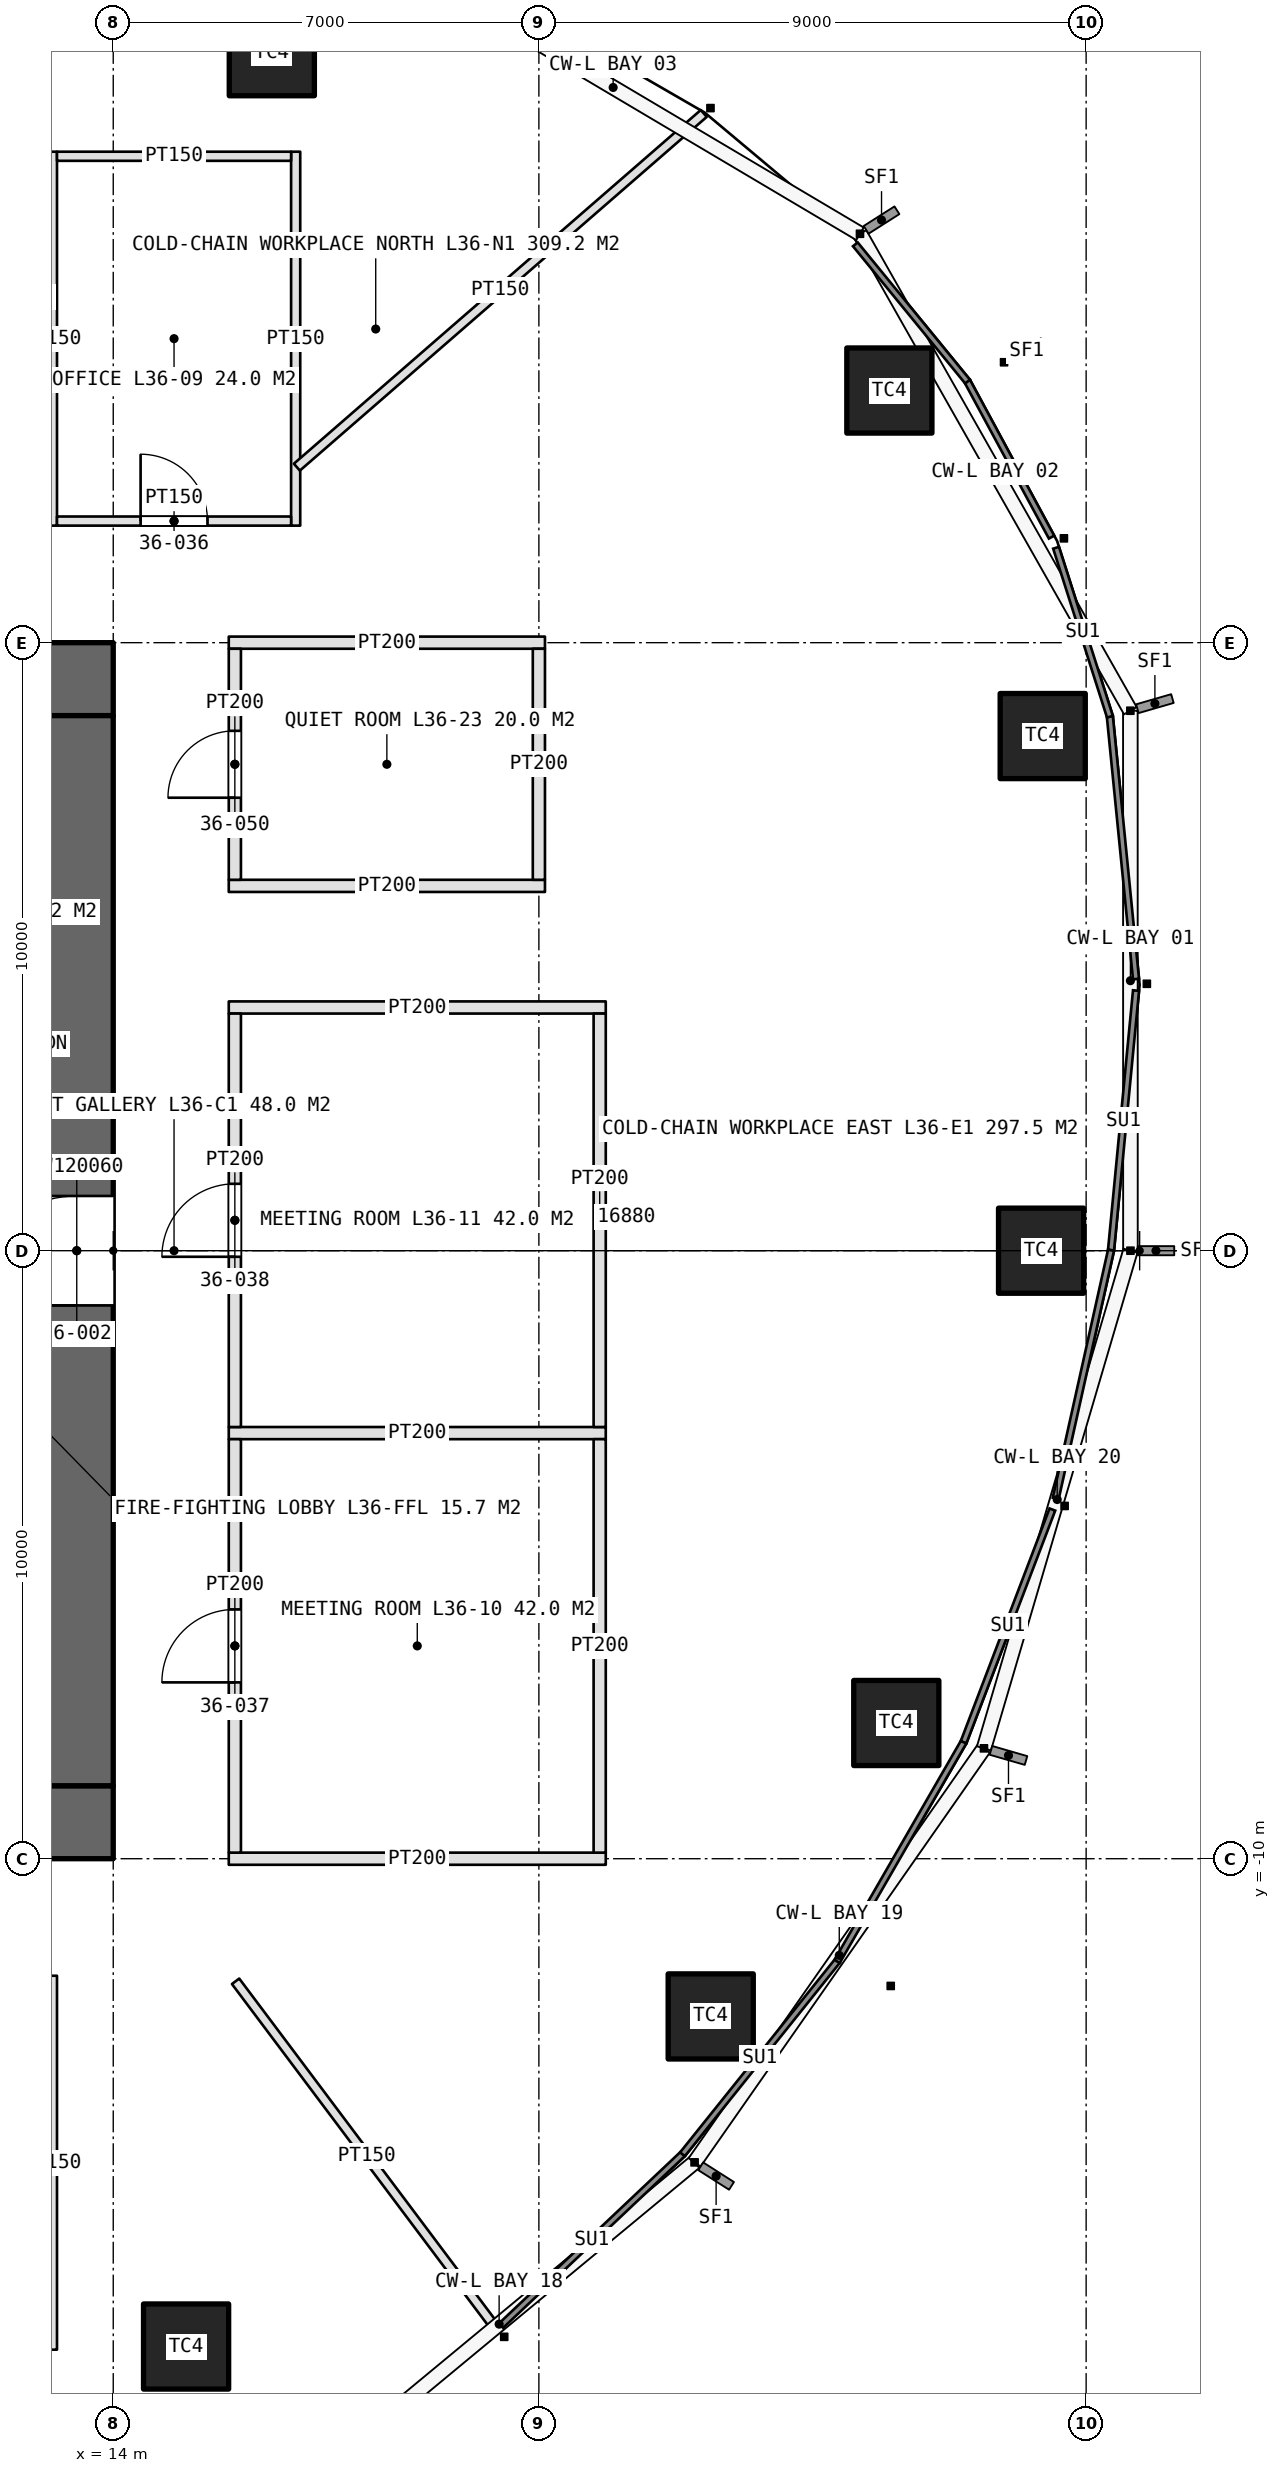
"""IFC4 building model, lengths in metres.
Left out: names, types, materials, properties, quantities, classifications, styles, units other than length and angle.
Written with IfcOpenShell. Run it as: python <this file> out.ifc"""

import sys

from ifc_helpers import new_model, si_unit, direction, frame, frame_2d, origin, origin_2d, place, context, subcontext, project, spatial, rectangle, extrude, element, fill, save


model = new_model("IFC4")
c1 = context("Model", 3, precision=1e-05, world=origin(), true_north=direction((0.0, 1.0)))
c2 = subcontext(c1, "Body", "Model", "MODEL_VIEW")
j1 = project(units=[si_unit("LENGTHUNIT", "METRE"), si_unit("PLANEANGLEUNIT", "RADIAN")], contexts=[c1])
p1 = place(None, origin())
s1 = spatial("IfcSite", under=j1, at=p1, CompositionType="ELEMENT")
p2 = place(p1, origin())
s2 = spatial("IfcBuilding", under=s1, at=p2, CompositionType="ELEMENT")
p3 = place(p2, frame((0.0, 0.0, 168.0)))
s3 = spatial("IfcBuildingStorey", under=s2, at=p3, CompositionType="ELEMENT", Elevation=168.0)
p4 = place(p3, frame((-14.0, -9.4, 0.0), z_axis=(0.0, 0.0, 1.0), x_axis=(1.0, 0.0, 0.0)))
e1 = element("IfcWall", 1, at=p4, inside=s3, PredefinedType="SHEAR", context=c2, shape_type="SweptSolid", body=[
    extrude(rectangle(XDim=28.0, YDim=1.2, at=frame_2d((14.0, 0.0))), origin(), (0.0, 0.0, 1.0), 4.2),
])
p5 = place(p4, frame((13.1, 0.0, 0.0)))
e2 = element("IfcOpeningElement", 2, at=p5, cuts=e1, PredefinedType="OPENING", context=c2, shape_type="SweptSolid", body=[
    extrude(rectangle(XDim=1.8, YDim=2.4, at=frame_2d((0.9, 1.2))), frame((0.0, 0.61, 0.0), z_axis=(0.0, -1.0, 0.0), x_axis=(1.0, 0.0, 0.0)), (0.0, 0.0, 1.0), 1.22),
])
p6 = place(p4, frame((22.9, 0.0, 0.0)))
e3 = element("IfcOpeningElement", 3, at=p6, cuts=e1, PredefinedType="OPENING", context=c2, shape_type="SweptSolid", body=[
    extrude(rectangle(XDim=2.2, YDim=2.7, at=frame_2d((1.1, 1.35))), frame((0.0, 0.61, 0.0), z_axis=(0.0, -1.0, 0.0), x_axis=(1.0, 0.0, 0.0)), (0.0, 0.0, 1.0), 1.22),
])
p7 = place(p3, frame((14.0, 9.4, 0.0), z_axis=(0.0, 0.0, 1.0), x_axis=(-1.0, 0.0, 0.0)))
e4 = element("IfcWall", 4, at=p7, inside=s3, PredefinedType="SHEAR", context=c2, shape_type="SweptSolid", body=[
    extrude(rectangle(XDim=28.0, YDim=1.2, at=frame_2d((14.0, 0.0))), origin(), (0.0, 0.0, 1.0), 4.2),
])
p8 = place(p7, frame((24.0, 0.0, 0.0)))
e5 = element("IfcOpeningElement", 5, at=p8, cuts=e4, PredefinedType="OPENING", context=c2, shape_type="SweptSolid", body=[
    extrude(rectangle(XDim=1.0, YDim=2.4, at=frame_2d((0.5, 1.2))), frame((0.0, 0.61, 0.0), z_axis=(0.0, -1.0, 0.0), x_axis=(1.0, 0.0, 0.0)), (0.0, 0.0, 1.0), 1.22),
])
p9 = place(p7, frame((13.1, 0.0, 0.0)))
e6 = element("IfcOpeningElement", 6, at=p9, cuts=e4, PredefinedType="OPENING", context=c2, shape_type="SweptSolid", body=[
    extrude(rectangle(XDim=1.8, YDim=2.4, at=frame_2d((0.9, 1.2))), frame((0.0, 0.61, 0.0), z_axis=(0.0, -1.0, 0.0), x_axis=(1.0, 0.0, 0.0)), (0.0, 0.0, 1.0), 1.22),
])
p10 = place(p3, frame((13.4, -8.8, 0.0), z_axis=(0.0, 0.0, 1.0), x_axis=(0.0, 1.0, 0.0)))
e7 = element("IfcWall", 7, at=p10, inside=s3, PredefinedType="SHEAR", context=c2, shape_type="SweptSolid", body=[
    extrude(rectangle(XDim=17.6, YDim=1.2, at=frame_2d((8.8, 0.0))), origin(), (0.0, 0.0, 1.0), 4.2),
])
p11 = place(p10, frame((7.9, 0.0, 0.0)))
e8 = element("IfcOpeningElement", 8, at=p11, cuts=e7, PredefinedType="OPENING", context=c2, shape_type="SweptSolid", body=[
    extrude(rectangle(XDim=1.8, YDim=2.4, at=frame_2d((0.9, 1.2))), frame((0.0, 0.61, 0.0), z_axis=(0.0, -1.0, 0.0), x_axis=(1.0, 0.0, 0.0)), (0.0, 0.0, 1.0), 1.22),
])
for number, where, z_axis, x_axis in (
    (9, (29.259, 0.0, 0.0), (0.0, 0.0, 1.0), (1.0, 0.0, 0.0)),
    (10, (29.286, 8.464, 0.0), (0.0, 0.0, 1.0), (1.0, 0.0, 0.0)),
    (11, (26.764, 14.147, 0.0), (0.0, 0.0, 1.0), (1.0, 0.0, 0.0)),
    (12, (16.608, 19.695, 0.0), (0.0, 0.0, 1.0), (1.0, 0.0, 0.0)),
    (13, (15.198, -18.023, 0.0), (0.0, 0.0, 1.0), (1.0, 0.0, 0.0)),
    (14, (23.826, -12.594, 0.0), (0.0, 0.0, 1.0), (1.0, 0.0, 0.0)),
    (15, (26.878, -7.768, 0.0), (0.0, 0.0, 1.0), (1.0, 0.0, 0.0)),
):
    element("IfcColumn", number, at=place(p3, frame(where, z_axis=z_axis, x_axis=x_axis)), inside=s3, PredefinedType="COLUMN", context=c2, shape_type="SweptSolid", body=[
        extrude(rectangle(XDim=1.4, YDim=1.4, at=origin_2d()), origin(), (0.0, 0.0, 1.0), 4.2),
    ])
for number, where, z_axis, x_axis in (
    (16, (13.0, 11.925, 0.0), (0.0, 0.0, 1.0), (0.0, 1.0, 0.0)),
    (17, (17.0, 11.925, 0.0), (0.0, 0.0, 1.0), (0.0, 1.0, 0.0)),
):
    element("IfcWall", number, at=place(p3, frame(where, z_axis=z_axis, x_axis=x_axis)), inside=s3, PredefinedType="PARTITIONING", context=c2, shape_type="SweptSolid", body=[
        extrude(rectangle(XDim=6.15, YDim=0.15, at=frame_2d((3.075, 0.0))), origin(), (0.0, 0.0, 1.0), 3.0),
    ])
p12 = place(p3, frame((13.075, 12.0, 0.0), z_axis=(0.0, 0.0, 1.0), x_axis=(1.0, 0.0, 0.0)))
e18 = element("IfcWall", 18, at=p12, inside=s3, PredefinedType="PARTITIONING", context=c2, shape_type="SweptSolid", body=[
    extrude(rectangle(XDim=3.85, YDim=0.15, at=frame_2d((1.925, 0.0))), origin(), (0.0, 0.0, 1.0), 3.0),
])
p13 = place(p12, frame((1.375, 0.0, 0.0)))
e19 = element("IfcOpeningElement", 19, at=p13, cuts=e18, PredefinedType="OPENING", context=c2, shape_type="SweptSolid", body=[
    extrude(rectangle(XDim=1.1, YDim=2.3, at=frame_2d((0.55, 1.15))), frame((0.0, 0.085, 0.0), z_axis=(0.0, -1.0, 0.0), x_axis=(1.0, 0.0, 0.0)), (0.0, 0.0, 1.0), 0.17),
])
p14 = place(p3, frame((13.075, 18.0, 0.0), z_axis=(0.0, 0.0, 1.0), x_axis=(1.0, 0.0, 0.0)))
e20 = element("IfcWall", 20, at=p14, inside=s3, PredefinedType="PARTITIONING", context=c2, shape_type="SweptSolid", body=[
    extrude(rectangle(XDim=3.85, YDim=0.15, at=frame_2d((1.925, 0.0))), origin(), (0.0, 0.0, 1.0), 3.0),
])
for number, where, z_axis, x_axis in (
    (21, (15.9, -10.0, 0.0), (0.0, 0.0, 1.0), (1.0, 0.0, 0.0)),
    (22, (15.9, -3.0, 0.0), (0.0, 0.0, 1.0), (1.0, 0.0, 0.0)),
    (23, (15.9, 4.0, 0.0), (0.0, 0.0, 1.0), (1.0, 0.0, 0.0)),
):
    element("IfcWall", number, at=place(p3, frame(where, z_axis=z_axis, x_axis=x_axis)), inside=s3, PredefinedType="PARTITIONING", context=c2, shape_type="SweptSolid", body=[
        extrude(rectangle(XDim=6.2, YDim=0.2, at=frame_2d((3.1, 0.0))), origin(), (0.0, 0.0, 1.0), 3.0),
    ])
p15 = place(p3, frame((16.0, -9.9, 0.0), z_axis=(0.0, 0.0, 1.0), x_axis=(0.0, 1.0, 0.0)))
e24 = element("IfcWall", 24, at=p15, inside=s3, PredefinedType="PARTITIONING", context=c2, shape_type="SweptSolid", body=[
    extrude(rectangle(XDim=6.8, YDim=0.2, at=frame_2d((3.4, 0.0))), origin(), (0.0, 0.0, 1.0), 3.0),
])
p16 = place(p15, frame((2.8, 0.0, 0.0)))
e25 = element("IfcOpeningElement", 25, at=p16, cuts=e24, PredefinedType="OPENING", context=c2, shape_type="SweptSolid", body=[
    extrude(rectangle(XDim=1.2, YDim=2.4, at=frame_2d((0.6, 1.2))), frame((0.0, 0.11, 0.0), z_axis=(0.0, -1.0, 0.0), x_axis=(1.0, 0.0, 0.0)), (0.0, 0.0, 1.0), 0.22),
])
p17 = place(p3, frame((22.0, -9.9, 0.0), z_axis=(0.0, 0.0, 1.0), x_axis=(0.0, 1.0, 0.0)))
e26 = element("IfcWall", 26, at=p17, inside=s3, PredefinedType="PARTITIONING", context=c2, shape_type="SweptSolid", body=[
    extrude(rectangle(XDim=6.8, YDim=0.2, at=frame_2d((3.4, 0.0))), origin(), (0.0, 0.0, 1.0), 3.0),
])
p18 = place(p3, frame((16.0, -2.9, 0.0), z_axis=(0.0, 0.0, 1.0), x_axis=(0.0, 1.0, 0.0)))
e27 = element("IfcWall", 27, at=p18, inside=s3, PredefinedType="PARTITIONING", context=c2, shape_type="SweptSolid", body=[
    extrude(rectangle(XDim=6.8, YDim=0.2, at=frame_2d((3.4, 0.0))), origin(), (0.0, 0.0, 1.0), 3.0),
])
p19 = place(p18, frame((2.8, 0.0, 0.0)))
e28 = element("IfcOpeningElement", 28, at=p19, cuts=e27, PredefinedType="OPENING", context=c2, shape_type="SweptSolid", body=[
    extrude(rectangle(XDim=1.2, YDim=2.4, at=frame_2d((0.6, 1.2))), frame((0.0, 0.11, 0.0), z_axis=(0.0, -1.0, 0.0), x_axis=(1.0, 0.0, 0.0)), (0.0, 0.0, 1.0), 0.22),
])
p20 = place(p3, frame((22.0, -2.9, 0.0), z_axis=(0.0, 0.0, 1.0), x_axis=(0.0, 1.0, 0.0)))
e29 = element("IfcWall", 29, at=p20, inside=s3, PredefinedType="PARTITIONING", context=c2, shape_type="SweptSolid", body=[
    extrude(rectangle(XDim=6.8, YDim=0.2, at=frame_2d((3.4, 0.0))), origin(), (0.0, 0.0, 1.0), 3.0),
])
p21 = place(p3, frame((13.0, -11.925, 0.0), z_axis=(0.0, 0.0, 1.0), x_axis=(0.0, -1.0, 0.0)))
e30 = element("IfcWall", 30, at=p21, inside=s3, PredefinedType="PARTITIONING", context=c2, shape_type="SweptSolid", body=[
    extrude(rectangle(XDim=6.15, YDim=0.15, at=frame_2d((3.075, 0.0))), origin(), (0.0, 0.0, 1.0), 3.0),
])
for number, where, z_axis, x_axis in (
    (31, (15.9, 6.0, 0.0), (0.0, 0.0, 1.0), (1.0, 0.0, 0.0)),
    (32, (15.9, 10.0, 0.0), (0.0, 0.0, 1.0), (1.0, 0.0, 0.0)),
):
    element("IfcWall", number, at=place(p3, frame(where, z_axis=z_axis, x_axis=x_axis)), inside=s3, PredefinedType="PARTITIONING", context=c2, shape_type="SweptSolid", body=[
        extrude(rectangle(XDim=5.2, YDim=0.2, at=frame_2d((2.6, 0.0))), origin(), (0.0, 0.0, 1.0), 3.0),
    ])
p22 = place(p3, frame((16.0, 6.1, 0.0), z_axis=(0.0, 0.0, 1.0), x_axis=(0.0, 1.0, 0.0)))
e33 = element("IfcWall", 33, at=p22, inside=s3, PredefinedType="PARTITIONING", context=c2, shape_type="SweptSolid", body=[
    extrude(rectangle(XDim=3.8, YDim=0.2, at=frame_2d((1.9, 0.0))), origin(), (0.0, 0.0, 1.0), 3.0),
])
p23 = place(p22, frame((1.35, 0.0, 0.0)))
e34 = element("IfcOpeningElement", 34, at=p23, cuts=e33, PredefinedType="OPENING", context=c2, shape_type="SweptSolid", body=[
    extrude(rectangle(XDim=1.1, YDim=2.3, at=frame_2d((0.55, 1.15))), frame((0.0, 0.11, 0.0), z_axis=(0.0, -1.0, 0.0), x_axis=(1.0, 0.0, 0.0)), (0.0, 0.0, 1.0), 0.22),
])
p24 = place(p3, frame((21.0, 6.1, 0.0), z_axis=(0.0, 0.0, 1.0), x_axis=(0.0, 1.0, 0.0)))
e35 = element("IfcWall", 35, at=p24, inside=s3, PredefinedType="PARTITIONING", context=c2, shape_type="SweptSolid", body=[
    extrude(rectangle(XDim=3.8, YDim=0.2, at=frame_2d((1.9, 0.0))), origin(), (0.0, 0.0, 1.0), 3.0),
])
p25 = place(p3, frame((16.012, -12.016, 0.0), z_axis=(0.0, 0.0, 1.0), x_axis=(0.600059749679, -0.799955184254, 0.0)))
e36 = element("IfcWall", 36, at=p25, inside=s3, PredefinedType="PARTITIONING", context=c2, shape_type="SweptSolid", body=[
    extrude(rectangle(XDim=7.191, YDim=0.15, at=frame_2d((3.596, 0.0))), origin(), (0.0, 0.0, 1.0), 3.0),
])
p26 = place(p3, frame((17.02, 12.887, 0.0), z_axis=(0.0, 0.0, 1.0), x_axis=(0.75468613342, 0.656086000479, 0.0)))
e37 = element("IfcWall", 37, at=p26, inside=s3, PredefinedType="PARTITIONING", context=c2, shape_type="SweptSolid", body=[
    extrude(rectangle(XDim=8.867, YDim=0.15, at=frame_2d((4.433, 0.0))), origin(), (0.0, 0.0, 1.0), 3.0),
])
p27 = place(p11, origin())
e38 = element("IfcDoor", 38, at=p27, inside=s3, OperationType="DOUBLE_DOOR_SINGLE_SWING", PredefinedType="DOOR", context=c2, shape_type="SweptSolid", body=[
    extrude(rectangle(XDim=1.8, YDim=2.4, at=frame_2d((0.9, 1.2))), frame((0.0, 0.025, 0.0), z_axis=(0.0, -1.0, 0.0), x_axis=(1.0, 0.0, 0.0)), (0.0, 0.0, 1.0), 0.05),
])
fill(e8, e38)
p28 = place(p13, origin())
e39 = element("IfcDoor", 39, at=p28, inside=s3, OperationType="SINGLE_SWING_LEFT", PredefinedType="DOOR", context=c2, shape_type="SweptSolid", body=[
    extrude(rectangle(XDim=1.1, YDim=2.3, at=frame_2d((0.55, 1.15))), frame((0.0, 0.025, 0.0), z_axis=(0.0, -1.0, 0.0), x_axis=(1.0, 0.0, 0.0)), (0.0, 0.0, 1.0), 0.05),
])
fill(e19, e39)
p29 = place(p16, origin())
e40 = element("IfcDoor", 40, at=p29, inside=s3, OperationType="SINGLE_SWING_LEFT", PredefinedType="DOOR", context=c2, shape_type="SweptSolid", body=[
    extrude(rectangle(XDim=1.2, YDim=2.4, at=frame_2d((0.6, 1.2))), frame((0.0, 0.025, 0.0), z_axis=(0.0, -1.0, 0.0), x_axis=(1.0, 0.0, 0.0)), (0.0, 0.0, 1.0), 0.05),
])
fill(e25, e40)
p30 = place(p19, origin())
e41 = element("IfcDoor", 41, at=p30, inside=s3, OperationType="SINGLE_SWING_LEFT", PredefinedType="DOOR", context=c2, shape_type="SweptSolid", body=[
    extrude(rectangle(XDim=1.2, YDim=2.4, at=frame_2d((0.6, 1.2))), frame((0.0, 0.025, 0.0), z_axis=(0.0, -1.0, 0.0), x_axis=(1.0, 0.0, 0.0)), (0.0, 0.0, 1.0), 0.05),
])
fill(e28, e41)
p31 = place(p23, origin())
e42 = element("IfcDoor", 42, at=p31, inside=s3, OperationType="SINGLE_SWING_LEFT", PredefinedType="DOOR", context=c2, shape_type="SweptSolid", body=[
    extrude(rectangle(XDim=1.1, YDim=2.3, at=frame_2d((0.55, 1.15))), frame((0.0, 0.025, 0.0), z_axis=(0.0, -1.0, 0.0), x_axis=(1.0, 0.0, 0.0)), (0.0, 0.0, 1.0), 0.05),
])
fill(e34, e42)
save(model, sys.argv[1])
